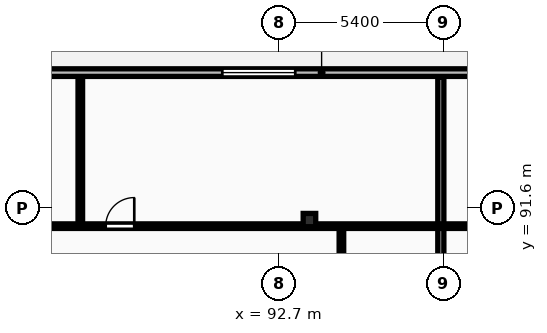
"""IFC4 building model, lengths in metres.
Left out: names, types, materials, properties, quantities, classifications, styles, units other than length and angle.
Written with IfcOpenShell. Run it as: python <this file> out.ifc"""

import sys

from ifc_helpers import new_model, si_unit, direction, frame, frame_2d, origin, origin_2d, place, context, subcontext, project, spatial, rectangle, i_section, extrude, element, fill, save


model = new_model("IFC4")
c1 = context("Model", 3, precision=1e-05, world=origin(), true_north=direction((0.0, 1.0)))
c2 = subcontext(c1, "Body", "Model", "MODEL_VIEW")
j1 = project(units=[si_unit("LENGTHUNIT", "METRE"), si_unit("PLANEANGLEUNIT", "RADIAN")], contexts=[c1])
p1 = place(None, origin())
s1 = spatial("IfcSite", under=j1, at=p1, CompositionType="ELEMENT")
p2 = place(p1, origin())
s2 = spatial("IfcBuilding", under=s1, at=p2, CompositionType="ELEMENT")
p3 = place(p2, frame((0.0, 0.0, 142.9)))
s3 = spatial("IfcBuildingStorey", under=s2, at=p3, CompositionType="ELEMENT", Elevation=142.9)
p4 = place(p3, frame((93.7, 91.2, 0.0), z_axis=(0.0, 0.0, 1.0), x_axis=(1.0, 0.0, 0.0)))
e1 = element("IfcColumn", 1, at=p4, inside=s3, PredefinedType="COLUMN", context=c2, shape_type="SweptSolid", body=[
    extrude(i_section(OverallWidth=0.412, OverallDepth=0.437, WebThickness=0.036, FlangeThickness=0.052, FilletRadius=0.015, at=origin_2d()), origin(), (0.0, 0.0, 1.0), 3.6),
])
p5 = place(p3, frame((130.6, 96.05, 0.0), z_axis=(0.0, 0.0, 1.0), x_axis=(-1.0, 0.0, 0.0)))
e2 = element("IfcWall", 2, at=p5, inside=s3, PredefinedType="STANDARD", context=c2, shape_type="SweptSolid", body=[
    extrude(rectangle(XDim=73.0, YDim=0.25, at=frame_2d((36.5, 0.0))), origin(), (0.0, 0.0, 1.0), 3.31),
])
p6 = place(p5, frame((67.921, 0.0, 0.0)))
e3 = element("IfcOpeningElement", 3, at=p6, cuts=e2, PredefinedType="OPENING", context=c2, shape_type="SweptSolid", body=[
    extrude(rectangle(XDim=1.8, YDim=2.2, at=frame_2d((0.9, 1.1))), frame((0.0, 0.135, 0.0), z_axis=(0.0, -1.0, 0.0), x_axis=(1.0, 0.0, 0.0)), (0.0, 0.0, 1.0), 0.27),
])
p7 = place(p5, frame((58.084, 0.0, 0.85)))
e4 = element("IfcOpeningElement", 4, at=p7, cuts=e2, PredefinedType="OPENING", context=c2, shape_type="SweptSolid", body=[
    extrude(rectangle(XDim=2.4, YDim=1.9, at=frame_2d((1.2, 0.95))), frame((0.0, 0.135, 0.0), z_axis=(0.0, -1.0, 0.0), x_axis=(1.0, 0.0, 0.0)), (0.0, 0.0, 1.0), 0.27),
])
p8 = place(p5, frame((48.101, 0.0, 0.0)))
e5 = element("IfcOpeningElement", 5, at=p8, cuts=e2, PredefinedType="OPENING", context=c2, shape_type="SweptSolid", body=[
    extrude(rectangle(XDim=1.8, YDim=2.2, at=frame_2d((0.9, 1.1))), frame((0.0, 0.135, 0.0), z_axis=(0.0, -1.0, 0.0), x_axis=(1.0, 0.0, 0.0)), (0.0, 0.0, 1.0), 0.27),
])
p9 = place(p5, frame((37.368, 0.0, 0.85)))
e6 = element("IfcOpeningElement", 6, at=p9, cuts=e2, PredefinedType="OPENING", context=c2, shape_type="SweptSolid", body=[
    extrude(rectangle(XDim=2.4, YDim=1.9, at=frame_2d((1.2, 0.95))), frame((0.0, 0.135, 0.0), z_axis=(0.0, -1.0, 0.0), x_axis=(1.0, 0.0, 0.0)), (0.0, 0.0, 1.0), 0.27),
])
p10 = place(p5, frame((22.445, 0.0, 0.85)))
e7 = element("IfcOpeningElement", 7, at=p10, cuts=e2, PredefinedType="OPENING", context=c2, shape_type="SweptSolid", body=[
    extrude(rectangle(XDim=2.4, YDim=1.9, at=frame_2d((1.2, 0.95))), frame((0.0, 0.135, 0.0), z_axis=(0.0, -1.0, 0.0), x_axis=(1.0, 0.0, 0.0)), (0.0, 0.0, 1.0), 0.27),
])
p11 = place(p5, frame((17.845, 0.0, 0.85)))
e8 = element("IfcOpeningElement", 8, at=p11, cuts=e2, PredefinedType="OPENING", context=c2, shape_type="SweptSolid", body=[
    extrude(rectangle(XDim=2.4, YDim=1.9, at=frame_2d((1.2, 0.95))), frame((0.0, 0.135, 0.0), z_axis=(0.0, -1.0, 0.0), x_axis=(1.0, 0.0, 0.0)), (0.0, 0.0, 1.0), 0.27),
])
p12 = place(p5, frame((28.239, 0.0, 0.0)))
e9 = element("IfcOpeningElement", 9, at=p12, cuts=e2, PredefinedType="OPENING", context=c2, shape_type="SweptSolid", body=[
    extrude(rectangle(XDim=1.8, YDim=2.2, at=frame_2d((0.9, 1.1))), frame((0.0, 0.135, 0.0), z_axis=(0.0, -1.0, 0.0), x_axis=(1.0, 0.0, 0.0)), (0.0, 0.0, 1.0), 0.27),
])
p13 = place(p5, frame((14.599, 0.0, 0.85)))
e10 = element("IfcOpeningElement", 10, at=p13, cuts=e2, PredefinedType="OPENING", context=c2, shape_type="SweptSolid", body=[
    extrude(rectangle(XDim=1.8, YDim=1.8, at=frame_2d((0.9, 0.9))), frame((0.0, 0.135, 0.0), z_axis=(0.0, -1.0, 0.0), x_axis=(1.0, 0.0, 0.0)), (0.0, 0.0, 1.0), 0.27),
])
p14 = place(p5, frame((8.234, 0.0, 0.0)))
e11 = element("IfcOpeningElement", 11, at=p14, cuts=e2, PredefinedType="OPENING", context=c2, shape_type="SweptSolid", body=[
    extrude(rectangle(XDim=1.8, YDim=2.2, at=frame_2d((0.9, 1.1))), frame((0.0, 0.135, 0.0), z_axis=(0.0, -1.0, 0.0), x_axis=(1.0, 0.0, 0.0)), (0.0, 0.0, 1.0), 0.27),
])
p15 = place(p5, frame((0.9, 0.0, 0.85)))
e12 = element("IfcOpeningElement", 12, at=p15, cuts=e2, PredefinedType="OPENING", context=c2, shape_type="SweptSolid", body=[
    extrude(rectangle(XDim=2.4, YDim=1.9, at=frame_2d((1.2, 0.95))), frame((0.0, 0.135, 0.0), z_axis=(0.0, -1.0, 0.0), x_axis=(1.0, 0.0, 0.0)), (0.0, 0.0, 1.0), 0.27),
])
p16 = place(p3, frame((98.021, 69.83, 0.0), z_axis=(0.0, 0.0, 1.0), x_axis=(0.0, 1.0, 0.0)))
e13 = element("IfcWall", 13, at=p16, inside=s3, PredefinedType="PARTITIONING", context=c2, shape_type="SweptSolid", body=[
    extrude(rectangle(XDim=26.07, YDim=0.2, at=frame_2d((13.035, 0.0))), origin(), (0.0, 0.0, 1.0), 3.31),
])
p17 = place(p3, frame((94.751, 69.81, 0.0), z_axis=(0.0, 0.0, 1.0), x_axis=(0.0, 1.0, 0.0)))
e14 = element("IfcWall", 14, at=p17, inside=s3, PredefinedType="PARTITIONING", context=c2, shape_type="SweptSolid", body=[
    extrude(rectangle(XDim=21.13, YDim=0.15, at=frame_2d((10.565, 0.0))), origin(), (0.0, 0.0, 1.0), 3.31),
])
p18 = place(p17, frame((2.406, 0.0, 0.0)))
e15 = element("IfcOpeningElement", 15, at=p18, cuts=e14, PredefinedType="OPENING", context=c2, shape_type="SweptSolid", body=[
    extrude(rectangle(XDim=0.96, YDim=2.1, at=frame_2d((0.48, 1.05))), frame((0.0, 0.085, 0.0), z_axis=(0.0, -1.0, 0.0), x_axis=(1.0, 0.0, 0.0)), (0.0, 0.0, 1.0), 0.17),
])
p19 = place(p17, frame((6.133, 0.0, 0.0)))
e16 = element("IfcOpeningElement", 16, at=p19, cuts=e14, PredefinedType="OPENING", context=c2, shape_type="SweptSolid", body=[
    extrude(rectangle(XDim=0.88, YDim=2.06, at=frame_2d((0.44, 1.03))), frame((0.0, 0.085, 0.0), z_axis=(0.0, -1.0, 0.0), x_axis=(1.0, 0.0, 0.0)), (0.0, 0.0, 1.0), 0.17),
])
p20 = place(p17, frame((11.231, 0.0, 0.0)))
e17 = element("IfcOpeningElement", 17, at=p20, cuts=e14, PredefinedType="OPENING", context=c2, shape_type="SweptSolid", body=[
    extrude(rectangle(XDim=0.84, YDim=2.04, at=frame_2d((0.42, 1.02))), frame((0.0, 0.085, 0.0), z_axis=(0.0, -1.0, 0.0), x_axis=(1.0, 0.0, 0.0)), (0.0, 0.0, 1.0), 0.17),
])
p21 = place(p3, frame((86.163, 91.08, 0.0), z_axis=(0.0, 0.0, 1.0), x_axis=(0.0, 1.0, 0.0)))
e18 = element("IfcWall", 18, at=p21, inside=s3, PredefinedType="PARTITIONING", context=c2, shape_type="SweptSolid", body=[
    extrude(rectangle(XDim=4.82, YDim=0.15, at=frame_2d((2.41, 0.0))), origin(), (0.0, 0.0, 1.0), 3.31),
])
p22 = place(p3, frame((76.994, 91.0, 0.0), z_axis=(0.0, 0.0, 1.0), x_axis=(1.0, 0.0, 0.0)))
e19 = element("IfcWall", 19, at=p22, inside=s3, PredefinedType="PARTITIONING", context=c2, shape_type="SweptSolid", body=[
    extrude(rectangle(XDim=20.947, YDim=0.15, at=frame_2d((10.474, 0.0))), origin(), (0.0, 0.0, 1.0), 3.003),
])
p23 = place(p22, frame((5.042, 0.0, 0.0)))
e20 = element("IfcOpeningElement", 20, at=p23, cuts=e19, PredefinedType="OPENING", context=c2, shape_type="SweptSolid", body=[
    extrude(rectangle(XDim=0.94, YDim=2.1, at=frame_2d((0.47, 1.05))), frame((0.0, 0.085, 0.0), z_axis=(0.0, -1.0, 0.0), x_axis=(1.0, 0.0, 0.0)), (0.0, 0.0, 1.0), 0.17),
])
p24 = place(p22, frame((10.004, 0.0, 0.0)))
e21 = element("IfcOpeningElement", 21, at=p24, cuts=e19, PredefinedType="OPENING", context=c2, shape_type="SweptSolid", body=[
    extrude(rectangle(XDim=0.94, YDim=2.1, at=frame_2d((0.47, 1.05))), frame((0.0, 0.085, 0.0), z_axis=(0.0, -1.0, 0.0), x_axis=(1.0, 0.0, 0.0)), (0.0, 0.0, 1.0), 0.17),
])
p25 = place(p3, frame((98.101, 91.0, 0.0), z_axis=(0.0, 0.0, 1.0), x_axis=(1.0, 0.0, 0.0)))
e22 = element("IfcWall", 22, at=p25, inside=s3, PredefinedType="PARTITIONING", context=c2, shape_type="SweptSolid", body=[
    extrude(rectangle(XDim=15.879, YDim=0.15, at=frame_2d((7.939, 0.0))), origin(), (0.0, 0.0, 1.0), 3.003),
])
p26 = place(p25, frame((2.45, 0.0, 0.0)))
e23 = element("IfcOpeningElement", 23, at=p26, cuts=e22, PredefinedType="OPENING", context=c2, shape_type="SweptSolid", body=[
    extrude(rectangle(XDim=0.94, YDim=2.1, at=frame_2d((0.47, 1.05))), frame((0.0, 0.085, 0.0), z_axis=(0.0, -1.0, 0.0), x_axis=(1.0, 0.0, 0.0)), (0.0, 0.0, 1.0), 0.17),
])
p27 = place(p25, frame((7.499, 0.0, 0.0)))
e24 = element("IfcOpeningElement", 24, at=p27, cuts=e22, PredefinedType="OPENING", context=c2, shape_type="SweptSolid", body=[
    extrude(rectangle(XDim=0.88, YDim=2.06, at=frame_2d((0.44, 1.03))), frame((0.0, 0.085, 0.0), z_axis=(0.0, -1.0, 0.0), x_axis=(1.0, 0.0, 0.0)), (0.0, 0.0, 1.0), 0.17),
])
p28 = place(p25, frame((11.249, 0.0, 0.0)))
e25 = element("IfcOpeningElement", 25, at=p28, cuts=e22, PredefinedType="OPENING", context=c2, shape_type="SweptSolid", body=[
    extrude(rectangle(XDim=0.88, YDim=2.06, at=frame_2d((0.44, 1.03))), frame((0.0, 0.085, 0.0), z_axis=(0.0, -1.0, 0.0), x_axis=(1.0, 0.0, 0.0)), (0.0, 0.0, 1.0), 0.17),
])
p29 = place(p9, origin())
e26 = element("IfcWindow", 26, at=p29, inside=s3, PartitioningType="DOUBLE_PANEL_VERTICAL", PredefinedType="WINDOW", context=c2, shape_type="SweptSolid", body=[
    extrude(rectangle(XDim=2.4, YDim=1.9, at=frame_2d((1.2, 0.95))), frame((0.0, 0.03, 0.0), z_axis=(0.0, -1.0, 0.0), x_axis=(1.0, 0.0, 0.0)), (0.0, 0.0, 1.0), 0.06),
])
fill(e6, e26)
p30 = place(p24, origin())
e27 = element("IfcDoor", 27, at=p30, inside=s3, OperationType="SINGLE_SWING_RIGHT", PredefinedType="DOOR", context=c2, shape_type="SweptSolid", body=[
    extrude(rectangle(XDim=0.94, YDim=2.1, at=frame_2d((0.47, 1.05))), frame((0.0, 0.025, 0.0), z_axis=(0.0, -1.0, 0.0), x_axis=(1.0, 0.0, 0.0)), (0.0, 0.0, 1.0), 0.05),
])
fill(e21, e27)
save(model, sys.argv[1])
